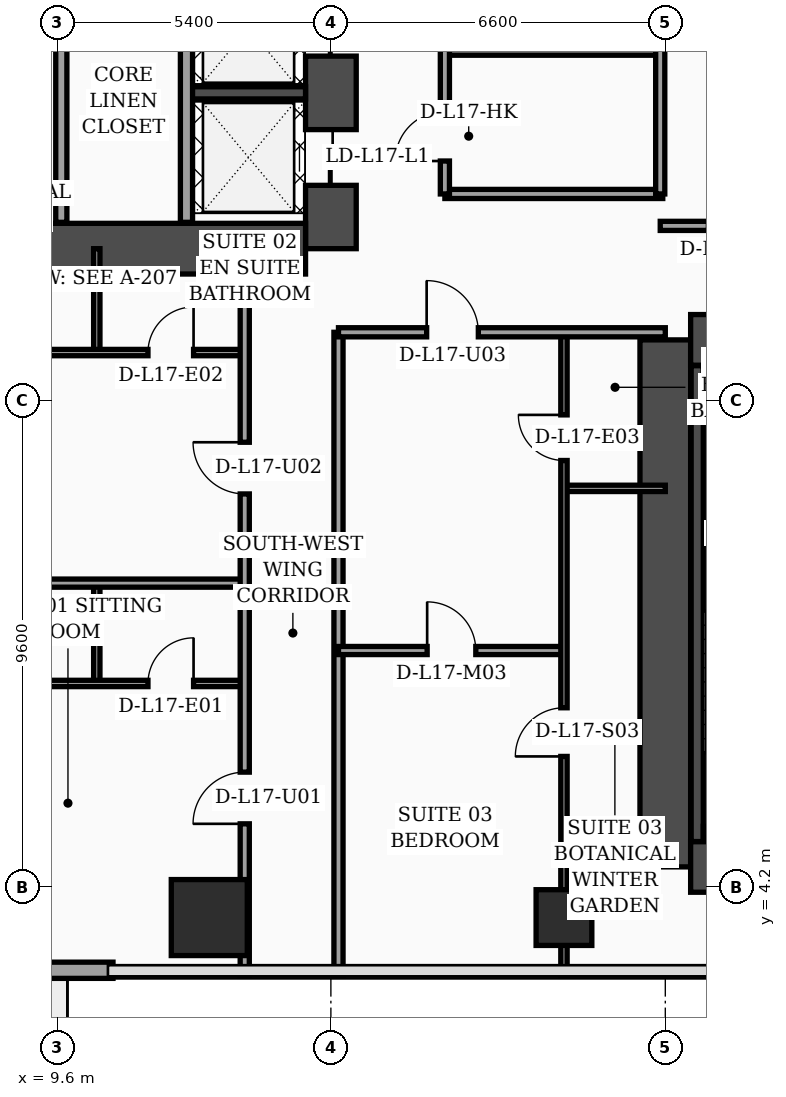
"""IFC4 building model, lengths in metres.
Left out: names, types, materials, properties, quantities, classifications, styles, units other than length and angle.
Written with IfcOpenShell. Run it as: python <this file> out.ifc"""

import sys

from ifc_helpers import new_model, si_unit, direction, frame, frame_2d, origin, origin_2d, place, context, subcontext, project, spatial, rectangle, hollow_rectangle, extrude, element, fill, save


model = new_model("IFC4")
c1 = context("Model", 3, precision=1e-05, world=origin(), true_north=direction((0.0, 1.0)))
c2 = subcontext(c1, "Body", "Model", "MODEL_VIEW")
j1 = project(units=[si_unit("LENGTHUNIT", "METRE"), si_unit("PLANEANGLEUNIT", "RADIAN")], contexts=[c1])
p1 = place(None, origin())
s1 = spatial("IfcSite", under=j1, at=p1, CompositionType="ELEMENT")
p2 = place(p1, origin())
s2 = spatial("IfcBuilding", under=s1, at=p2, CompositionType="ELEMENT")
p3 = place(p2, frame((0.0, 0.0, 73.6)))
s3 = spatial("IfcBuildingStorey", under=s2, at=p3, CompositionType="ELEMENT", Elevation=73.6)
p4 = place(p3, frame((15.0, 16.8, 0.0), z_axis=(0.0, 0.0, 1.0), x_axis=(0.0, 1.0, 0.0)))
e1 = element("IfcWall", 1, at=p4, inside=s3, PredefinedType="SHEAR", context=c2, shape_type="SweptSolid", body=[
    extrude(rectangle(XDim=21.6, YDim=1.0, at=frame_2d((10.8, 0.0))), origin(), (0.0, 0.0, 1.0), 3.56),
])
p5 = place(p4, frame((8.65, 0.0, 0.0)))
e2 = element("IfcOpeningElement", 2, at=p5, cuts=e1, PredefinedType="OPENING", context=c2, shape_type="SweptSolid", body=[
    extrude(rectangle(XDim=1.1, YDim=2.2, at=frame_2d((0.55, 1.1))), frame((0.0, 0.51, 0.0), z_axis=(0.0, -1.0, 0.0), x_axis=(1.0, 0.0, 0.0)), (0.0, 0.0, 1.0), 1.02),
])
p6 = place(p4, frame((1.25, 0.0, 0.0)))
e3 = element("IfcOpeningElement", 3, at=p6, cuts=e1, PredefinedType="OPENING", context=c2, shape_type="SweptSolid", body=[
    extrude(rectangle(XDim=1.1, YDim=2.2, at=frame_2d((0.55, 1.1))), frame((0.0, 0.51, 0.0), z_axis=(0.0, -1.0, 0.0), x_axis=(1.0, 0.0, 0.0)), (0.0, 0.0, 1.0), 1.02),
])
p7 = place(p4, frame((3.8, 0.0, 0.0)))
e4 = element("IfcOpeningElement", 4, at=p7, cuts=e1, PredefinedType="OPENING", context=c2, shape_type="SweptSolid", body=[
    extrude(rectangle(XDim=1.1, YDim=2.2, at=frame_2d((0.55, 1.1))), frame((0.0, 0.51, 0.0), z_axis=(0.0, -1.0, 0.0), x_axis=(1.0, 0.0, 0.0)), (0.0, 0.0, 1.0), 1.02),
])
p8 = place(p4, frame((6.35, 0.0, 0.0)))
e5 = element("IfcOpeningElement", 5, at=p8, cuts=e1, PredefinedType="OPENING", context=c2, shape_type="SweptSolid", body=[
    extrude(rectangle(XDim=1.1, YDim=2.2, at=frame_2d((0.55, 1.1))), frame((0.0, 0.51, 0.0), z_axis=(0.0, -1.0, 0.0), x_axis=(1.0, 0.0, 0.0)), (0.0, 0.0, 1.0), 1.02),
])
p9 = place(p3, frame((4.7, 16.8, 0.0), z_axis=(0.0, 0.0, 1.0), x_axis=(1.0, 0.0, 0.0)))
e6 = element("IfcWall", 6, at=p9, inside=s3, PredefinedType="SHEAR", context=c2, shape_type="SweptSolid", body=[
    extrude(rectangle(XDim=9.8, YDim=1.0, at=frame_2d((4.9, 0.0))), origin(), (0.0, 0.0, 1.0), 3.56),
])
p10 = place(p3, frame((21.6, 4.6, 0.0), z_axis=(0.0, 0.0, 1.0), x_axis=(0.0, 1.0, 0.0)))
e7 = element("IfcWall", 7, at=p10, inside=s3, PredefinedType="SHEAR", context=c2, shape_type="SweptSolid", body=[
    extrude(rectangle(XDim=10.4, YDim=1.0, at=frame_2d((5.2, 0.0))), origin(), (0.0, 0.0, 1.0), 3.56),
])
p11 = place(p3, frame((22.1, 15.0, 0.0), z_axis=(0.0, 0.0, 1.0), x_axis=(1.0, 0.0, 0.0)))
e8 = element("IfcWall", 8, at=p11, inside=s3, PredefinedType="SHEAR", context=c2, shape_type="SweptSolid", body=[
    extrude(rectangle(XDim=9.8, YDim=1.0, at=frame_2d((4.9, 0.0))), origin(), (0.0, 0.0, 1.0), 3.56),
])
p12 = place(p11, frame((4.8, 0.0, 0.0)))
e9 = element("IfcOpeningElement", 9, at=p12, cuts=e8, PredefinedType="OPENING", context=c2, shape_type="SweptSolid", body=[
    extrude(rectangle(XDim=1.1, YDim=2.2, at=frame_2d((0.55, 1.1))), frame((0.0, 0.51, 0.0), z_axis=(0.0, -1.0, 0.0), x_axis=(1.0, 0.0, 0.0)), (0.0, 0.0, 1.0), 1.02),
])
p13 = place(p3, frame((22.1, 4.6, 0.0), z_axis=(0.0, 0.0, 1.0), x_axis=(1.0, 0.0, 0.0)))
e10 = element("IfcWall", 10, at=p13, inside=s3, PredefinedType="SHEAR", context=c2, shape_type="SweptSolid", body=[
    extrude(rectangle(XDim=9.8, YDim=1.0, at=frame_2d((4.9, 0.0))), origin(), (0.0, 0.0, 1.0), 3.56),
])
p14 = place(p3, frame((22.23, 5.1, 0.0), z_axis=(0.0, 0.0, 1.0), x_axis=(0.0, 1.0, 0.0)))
e11 = element("IfcWall", 11, at=p14, inside=s3, PredefinedType="SOLIDWALL", context=c2, shape_type="SweptSolid", body=[
    extrude(rectangle(XDim=9.39, YDim=0.24, at=frame_2d((4.695, 0.0))), origin(), (0.0, 0.0, 1.0), 3.56),
])
for number, where, z_axis, x_axis in (
    (12, (22.35, 5.28, 0.0), (0.0, 0.0, 1.0), (1.0, 0.0, 0.0)),
    (13, (22.35, 14.37, 0.0), (0.0, 0.0, 1.0), (1.0, 0.0, 0.0)),
):
    element("IfcWall", number, at=place(p3, frame(where, z_axis=z_axis, x_axis=x_axis)), inside=s3, PredefinedType="SOLIDWALL", context=c2, shape_type="SweptSolid", body=[
        extrude(rectangle(XDim=3.1, YDim=0.24, at=frame_2d((1.55, 0.0))), origin(), (0.0, 0.0, 1.0), 3.56),
    ])
p15 = place(p3, frame((12.18, 19.875, 0.0), z_axis=(0.0, 0.0, 1.0), x_axis=(1.0, 0.0, 0.0)))
e14 = element("IfcWall", 14, at=p15, inside=s3, PredefinedType="SOLIDWALL", context=c2, shape_type="SweptSolid", body=[
    extrude(rectangle(XDim=2.32, YDim=0.24, at=frame_2d((1.16, 0.0))), origin(), (0.0, 0.0, 1.0), 3.56),
])
p16 = place(p3, frame((12.6, 3.6, 0.0), z_axis=(0.0, 0.0, 1.0), x_axis=(1.0, 0.0, 0.0)))
e15 = element("IfcColumn", 15, at=p16, inside=s3, PredefinedType="COLUMN", context=c2, shape_type="SweptSolid", body=[
    extrude(rectangle(XDim=1.5, YDim=1.5, at=origin_2d()), origin(), (0.0, 0.0, 1.0), 3.56),
])
p17 = place(p3, frame((19.6, 3.6, 0.0), z_axis=(0.0, 0.0, 1.0), x_axis=(1.0, 0.0, 0.0)))
e16 = element("IfcColumn", 16, at=p17, inside=s3, PredefinedType="COLUMN", context=c2, shape_type="SweptSolid", body=[
    extrude(hollow_rectangle(XDim=1.1, YDim=1.1, WallThickness=0.045, at=origin_2d()), origin(), (0.0, 0.0, 1.0), 3.56),
])
p18 = place(p3, frame((3.1, 2.56, 0.0), z_axis=(0.0, 0.0, 1.0), x_axis=(1.0, 0.0, 0.0)))
e17 = element("IfcWall", 17, at=p18, inside=s3, PredefinedType="SOLIDWALL", context=c2, shape_type="SweptSolid", body=[
    extrude(rectangle(XDim=7.6, YDim=0.32, at=frame_2d((3.8, 0.0))), origin(), (0.0, 0.0, 1.0), 3.56),
])
p19 = place(p18, frame((0.45, 0.0, 0.75)))
e18 = element("IfcOpeningElement", 18, at=p19, cuts=e17, PredefinedType="OPENING", context=c2, shape_type="SweptSolid", body=[
    extrude(rectangle(XDim=1.0, YDim=1.6, at=frame_2d((0.5, 0.8))), frame((0.0, 0.17, 0.0), z_axis=(0.0, -1.0, 0.0), x_axis=(1.0, 0.0, 0.0)), (0.0, 0.0, 1.0), 0.34),
])
p20 = place(p18, frame((3.8, 0.0, 0.0)))
e19 = element("IfcOpeningElement", 19, at=p20, cuts=e17, PredefinedType="OPENING", context=c2, shape_type="SweptSolid", body=[
    extrude(rectangle(XDim=1.4, YDim=2.25, at=frame_2d((0.7, 1.125))), frame((0.0, 0.17, 0.0), z_axis=(0.0, -1.0, 0.0), x_axis=(1.0, 0.0, 0.0)), (0.0, 0.0, 1.0), 0.34),
])
p21 = place(p3, frame((9.68, 17.32, 0.0), z_axis=(0.0, 0.0, 1.0), x_axis=(0.0, 1.0, 0.0)))
e20 = element("IfcWall", 20, at=p21, inside=s3, PredefinedType="SOLIDWALL", context=c2, shape_type="SweptSolid", body=[
    extrude(rectangle(XDim=7.68, YDim=0.22, at=frame_2d((3.84, 0.0))), origin(), (0.0, 0.0, 1.0), 3.56),
])
p22 = place(p3, frame((12.15, 17.32, 0.0), z_axis=(0.0, 0.0, 1.0), x_axis=(0.0, 1.0, 0.0)))
e21 = element("IfcWall", 21, at=p22, inside=s3, PredefinedType="SOLIDWALL", context=c2, shape_type="SweptSolid", body=[
    extrude(rectangle(XDim=7.65, YDim=0.24, at=frame_2d((3.825, 0.0))), origin(), (0.0, 0.0, 1.0), 3.56),
])
p23 = place(p3, frame((10.38, 8.22, 0.0), z_axis=(0.0, 0.0, 1.0), x_axis=(0.0, 1.0, 0.0)))
e22 = element("IfcWall", 22, at=p23, inside=s3, PredefinedType="PARTITIONING", context=c2, shape_type="SweptSolid", body=[
    extrude(rectangle(XDim=1.98, YDim=0.125, at=frame_2d((0.99, 0.0))), origin(), (0.0, 0.0, 1.0), 3.14),
])
p24 = place(p3, frame((3.2, 8.22, 0.0), z_axis=(0.0, 0.0, 1.0), x_axis=(1.0, 0.0, 0.0)))
e23 = element("IfcWall", 23, at=p24, inside=s3, PredefinedType="PARTITIONING", context=c2, shape_type="SweptSolid", body=[
    extrude(rectangle(XDim=10.1, YDim=0.125, at=frame_2d((5.05, 0.0))), origin(), (0.0, 0.0, 1.0), 2.84),
])
p25 = place(p24, frame((3.29, 0.0, 0.0)))
e24 = element("IfcOpeningElement", 24, at=p25, cuts=e23, PredefinedType="OPENING", context=c2, shape_type="SweptSolid", body=[
    extrude(rectangle(XDim=0.96, YDim=2.2, at=frame_2d((0.48, 1.1))), frame((0.0, 0.073, 0.0), z_axis=(0.0, -1.0, 0.0), x_axis=(1.0, 0.0, 0.0)), (0.0, 0.0, 1.0), 0.145),
])
p26 = place(p24, frame((8.19, 0.0, 0.0)))
e25 = element("IfcOpeningElement", 25, at=p26, cuts=e23, PredefinedType="OPENING", context=c2, shape_type="SweptSolid", body=[
    extrude(rectangle(XDim=0.9, YDim=2.15, at=frame_2d((0.45, 1.075))), frame((0.0, 0.073, 0.0), z_axis=(0.0, -1.0, 0.0), x_axis=(1.0, 0.0, 0.0)), (0.0, 0.0, 1.0), 0.145),
])
p27 = place(p3, frame((10.38, 14.75, 0.0), z_axis=(0.0, 0.0, 1.0), x_axis=(0.0, 1.0, 0.0)))
e26 = element("IfcWall", 26, at=p27, inside=s3, PredefinedType="PARTITIONING", context=c2, shape_type="SweptSolid", body=[
    extrude(rectangle(XDim=2.05, YDim=0.125, at=frame_2d((1.025, 0.0))), origin(), (0.0, 0.0, 1.0), 3.56),
])
p28 = place(p3, frame((0.08, 14.75, 0.0), z_axis=(0.0, 0.0, 1.0), x_axis=(1.0, 0.0, 0.0)))
e27 = element("IfcWall", 27, at=p28, inside=s3, PredefinedType="PARTITIONING", context=c2, shape_type="SweptSolid", body=[
    extrude(rectangle(XDim=13.22, YDim=0.125, at=frame_2d((6.61, 0.0))), origin(), (0.0, 0.0, 1.0), 2.84),
])
p29 = place(p28, frame((4.67, 0.0, 0.0)))
e28 = element("IfcOpeningElement", 28, at=p29, cuts=e27, PredefinedType="OPENING", context=c2, shape_type="SweptSolid", body=[
    extrude(rectangle(XDim=0.96, YDim=2.2, at=frame_2d((0.48, 1.1))), frame((0.0, 0.073, 0.0), z_axis=(0.0, -1.0, 0.0), x_axis=(1.0, 0.0, 0.0)), (0.0, 0.0, 1.0), 0.145),
])
p30 = place(p28, frame((11.31, 0.0, 0.0)))
e29 = element("IfcOpeningElement", 29, at=p30, cuts=e27, PredefinedType="OPENING", context=c2, shape_type="SweptSolid", body=[
    extrude(rectangle(XDim=0.9, YDim=2.15, at=frame_2d((0.45, 1.075))), frame((0.0, 0.073, 0.0), z_axis=(0.0, -1.0, 0.0), x_axis=(1.0, 0.0, 0.0)), (0.0, 0.0, 1.0), 0.145),
])
p31 = place(p3, frame((0.08, 10.2, 0.0), z_axis=(0.0, 0.0, 1.0), x_axis=(1.0, 0.0, 0.0)))
e30 = element("IfcWall", 30, at=p31, inside=s3, PredefinedType="PARTITIONING", context=c2, shape_type="SweptSolid", body=[
    extrude(rectangle(XDim=13.22, YDim=0.16, at=frame_2d((6.61, 0.0))), origin(), (0.0, 0.0, 1.0), 2.84),
])
p32 = place(p3, frame((13.3, 2.44, 0.0), z_axis=(0.0, 0.0, 1.0), x_axis=(0.0, 1.0, 0.0)))
e31 = element("IfcWall", 31, at=p32, inside=s3, PredefinedType="PARTITIONING", context=c2, shape_type="SweptSolid", body=[
    extrude(rectangle(XDim=14.36, YDim=0.18, at=frame_2d((7.18, 0.0))), origin(), (0.0, 0.0, 1.0), 3.04),
])
p33 = place(p32, frame((3.01, 0.0, 0.0)))
e32 = element("IfcOpeningElement", 32, at=p33, cuts=e31, PredefinedType="OPENING", context=c2, shape_type="SweptSolid", body=[
    extrude(rectangle(XDim=1.02, YDim=2.2, at=frame_2d((0.51, 1.1))), frame((0.0, 0.1, 0.0), z_axis=(0.0, -1.0, 0.0), x_axis=(1.0, 0.0, 0.0)), (0.0, 0.0, 1.0), 0.2),
])
p34 = place(p32, frame((9.52, 0.0, 0.0)))
e33 = element("IfcOpeningElement", 33, at=p34, cuts=e31, PredefinedType="OPENING", context=c2, shape_type="SweptSolid", body=[
    extrude(rectangle(XDim=1.02, YDim=2.2, at=frame_2d((0.51, 1.1))), frame((0.0, 0.1, 0.0), z_axis=(0.0, -1.0, 0.0), x_axis=(1.0, 0.0, 0.0)), (0.0, 0.0, 1.0), 0.2),
])
p35 = place(p3, frame((15.15, 2.44, 0.0), z_axis=(0.0, 0.0, 1.0), x_axis=(0.0, 1.0, 0.0)))
e34 = element("IfcWall", 34, at=p35, inside=s3, PredefinedType="PARTITIONING", context=c2, shape_type="SweptSolid", body=[
    extrude(rectangle(XDim=12.71, YDim=0.18, at=frame_2d((6.355, 0.0))), origin(), (0.0, 0.0, 1.0), 3.04),
])
p36 = place(p3, frame((19.6, 12.07, 0.0), z_axis=(0.0, 0.0, 1.0), x_axis=(1.0, 0.0, 0.0)))
e35 = element("IfcWall", 35, at=p36, inside=s3, PredefinedType="PARTITIONING", context=c2, shape_type="SweptSolid", body=[
    extrude(rectangle(XDim=2.0, YDim=0.125, at=frame_2d((1.0, 0.0))), origin(), (0.0, 0.0, 1.0), 3.56),
])
p37 = place(p3, frame((15.15, 8.87, 0.0), z_axis=(0.0, 0.0, 1.0), x_axis=(1.0, 0.0, 0.0)))
e36 = element("IfcWall", 36, at=p37, inside=s3, PredefinedType="PARTITIONING", context=c2, shape_type="SweptSolid", body=[
    extrude(rectangle(XDim=4.45, YDim=0.16, at=frame_2d((2.225, 0.0))), origin(), (0.0, 0.0, 1.0), 3.56),
])
p38 = place(p37, frame((1.75, 0.0, 0.0)))
e37 = element("IfcOpeningElement", 37, at=p38, cuts=e36, PredefinedType="OPENING", context=c2, shape_type="SweptSolid", body=[
    extrude(rectangle(XDim=0.96, YDim=2.2, at=frame_2d((0.48, 1.1))), frame((0.0, 0.09, 0.0), z_axis=(0.0, -1.0, 0.0), x_axis=(1.0, 0.0, 0.0)), (0.0, 0.0, 1.0), 0.18),
])
p39 = place(p3, frame((19.6, 2.44, 0.0), z_axis=(0.0, 0.0, 1.0), x_axis=(0.0, 1.0, 0.0)))
e38 = element("IfcWall", 38, at=p39, inside=s3, PredefinedType="PARTITIONING", context=c2, shape_type="SweptSolid", body=[
    extrude(rectangle(XDim=12.71, YDim=0.125, at=frame_2d((6.355, 0.0))), origin(), (0.0, 0.0, 1.0), 2.34),
])
p40 = place(p39, frame((4.34, 0.0, 0.0)))
e39 = element("IfcOpeningElement", 39, at=p40, cuts=e38, PredefinedType="OPENING", context=c2, shape_type="SweptSolid", body=[
    extrude(rectangle(XDim=0.96, YDim=2.2, at=frame_2d((0.48, 1.1))), frame((0.0, 0.073, 0.0), z_axis=(0.0, -1.0, 0.0), x_axis=(1.0, 0.0, 0.0)), (0.0, 0.0, 1.0), 0.145),
])
p41 = place(p39, frame((10.18, 0.0, 0.0)))
e40 = element("IfcOpeningElement", 40, at=p41, cuts=e38, PredefinedType="OPENING", context=c2, shape_type="SweptSolid", body=[
    extrude(rectangle(XDim=0.9, YDim=2.15, at=frame_2d((0.45, 1.075))), frame((0.0, 0.073, 0.0), z_axis=(0.0, -1.0, 0.0), x_axis=(1.0, 0.0, 0.0)), (0.0, 0.0, 1.0), 0.145),
])
p42 = place(p3, frame((15.15, 15.15, 0.0), z_axis=(0.0, 0.0, 1.0), x_axis=(1.0, 0.0, 0.0)))
e41 = element("IfcWall", 41, at=p42, inside=s3, PredefinedType="PARTITIONING", context=c2, shape_type="SweptSolid", body=[
    extrude(rectangle(XDim=6.45, YDim=0.18, at=frame_2d((3.225, 0.0))), origin(), (0.0, 0.0, 1.0), 2.34),
])
p43 = place(p42, frame((1.74, 0.0, 0.0)))
e42 = element("IfcOpeningElement", 42, at=p43, cuts=e41, PredefinedType="OPENING", context=c2, shape_type="SweptSolid", body=[
    extrude(rectangle(XDim=1.02, YDim=2.2, at=frame_2d((0.51, 1.1))), frame((0.0, 0.1, 0.0), z_axis=(0.0, -1.0, 0.0), x_axis=(1.0, 0.0, 0.0)), (0.0, 0.0, 1.0), 0.2),
])
p44 = place(p3, frame((17.25, 17.88, 0.0), z_axis=(0.0, 0.0, 1.0), x_axis=(1.0, 0.0, 0.0)))
e43 = element("IfcWall", 43, at=p44, inside=s3, PredefinedType="PARTITIONING", context=c2, shape_type="SweptSolid", body=[
    extrude(rectangle(XDim=4.3, YDim=0.18, at=frame_2d((2.15, 0.0))), origin(), (0.0, 0.0, 1.0), 3.56),
])
p45 = place(p3, frame((17.25, 20.68, 0.0), z_axis=(0.0, 0.0, 1.0), x_axis=(1.0, 0.0, 0.0)))
e44 = element("IfcWall", 44, at=p45, inside=s3, PredefinedType="PARTITIONING", context=c2, shape_type="SweptSolid", body=[
    extrude(rectangle(XDim=4.3, YDim=0.125, at=frame_2d((2.15, 0.0))), origin(), (0.0, 0.0, 1.0), 3.56),
])
p46 = place(p3, frame((21.5, 17.88, 0.0), z_axis=(0.0, 0.0, 1.0), x_axis=(0.0, 1.0, 0.0)))
e45 = element("IfcWall", 45, at=p46, inside=s3, PredefinedType="PARTITIONING", context=c2, shape_type="SweptSolid", body=[
    extrude(rectangle(XDim=6.44, YDim=0.18, at=frame_2d((3.22, 0.0))), origin(), (0.0, 0.0, 1.0), 3.56),
])
p47 = place(p3, frame((17.25, 17.88, 0.0), z_axis=(0.0, 0.0, 1.0), x_axis=(0.0, 1.0, 0.0)))
e46 = element("IfcWall", 46, at=p47, inside=s3, PredefinedType="PARTITIONING", context=c2, shape_type="SweptSolid", body=[
    extrude(rectangle(XDim=6.44, YDim=0.18, at=frame_2d((3.22, 0.0))), origin(), (0.0, 0.0, 1.0), 3.56),
])
p48 = place(p47, frame((0.65, 0.0, 0.0)))
e47 = element("IfcOpeningElement", 47, at=p48, cuts=e46, PredefinedType="OPENING", context=c2, shape_type="SweptSolid", body=[
    extrude(rectangle(XDim=0.98, YDim=2.15, at=frame_2d((0.49, 1.075))), frame((0.0, 0.1, 0.0), z_axis=(0.0, -1.0, 0.0), x_axis=(1.0, 0.0, 0.0)), (0.0, 0.0, 1.0), 0.2),
])
p49 = place(p47, frame((3.27, 0.0, 0.0)))
e48 = element("IfcOpeningElement", 48, at=p49, cuts=e46, PredefinedType="OPENING", context=c2, shape_type="SweptSolid", body=[
    extrude(rectangle(XDim=0.96, YDim=2.2, at=frame_2d((0.48, 1.1))), frame((0.0, 0.1, 0.0), z_axis=(0.0, -1.0, 0.0), x_axis=(1.0, 0.0, 0.0)), (0.0, 0.0, 1.0), 0.2),
])
p50 = place(p3, frame((21.5, 17.25, 0.0), z_axis=(0.0, 0.0, 1.0), x_axis=(1.0, 0.0, 0.0)))
e49 = element("IfcWall", 49, at=p50, inside=s3, PredefinedType="PARTITIONING", context=c2, shape_type="SweptSolid", body=[
    extrude(rectangle(XDim=19.65, YDim=0.18, at=frame_2d((9.825, 0.0))), origin(), (0.0, 0.0, 1.0), 2.84),
])
p51 = place(p50, frame((0.95, 0.0, 0.0)))
e50 = element("IfcOpeningElement", 50, at=p51, cuts=e49, PredefinedType="OPENING", context=c2, shape_type="SweptSolid", body=[
    extrude(rectangle(XDim=1.02, YDim=2.2, at=frame_2d((0.51, 1.1))), frame((0.0, 0.1, 0.0), z_axis=(0.0, -1.0, 0.0), x_axis=(1.0, 0.0, 0.0)), (0.0, 0.0, 1.0), 0.2),
])
p52 = place(p50, frame((7.47, 0.0, 0.0)))
e51 = element("IfcOpeningElement", 51, at=p52, cuts=e49, PredefinedType="OPENING", context=c2, shape_type="SweptSolid", body=[
    extrude(rectangle(XDim=1.02, YDim=2.2, at=frame_2d((0.51, 1.1))), frame((0.0, 0.1, 0.0), z_axis=(0.0, -1.0, 0.0), x_axis=(1.0, 0.0, 0.0)), (0.0, 0.0, 1.0), 0.2),
])
p53 = place(p50, frame((13.98, 0.0, 0.0)))
e52 = element("IfcOpeningElement", 52, at=p53, cuts=e49, PredefinedType="OPENING", context=c2, shape_type="SweptSolid", body=[
    extrude(rectangle(XDim=1.02, YDim=2.2, at=frame_2d((0.51, 1.1))), frame((0.0, 0.1, 0.0), z_axis=(0.0, -1.0, 0.0), x_axis=(1.0, 0.0, 0.0)), (0.0, 0.0, 1.0), 0.2),
])
p54 = place(p26, origin())
e53 = element("IfcDoor", 53, at=p54, inside=s3, OperationType="SINGLE_SWING_RIGHT", PredefinedType="DOOR", context=c2, shape_type="SweptSolid", body=[
    extrude(rectangle(XDim=0.9, YDim=2.15, at=frame_2d((0.45, 1.075))), frame((0.0, 0.025, 0.0), z_axis=(0.0, -1.0, 0.0), x_axis=(1.0, 0.0, 0.0)), (0.0, 0.0, 1.0), 0.05),
])
fill(e25, e53)
p55 = place(p30, origin())
e54 = element("IfcDoor", 54, at=p55, inside=s3, OperationType="SINGLE_SWING_RIGHT", PredefinedType="DOOR", context=c2, shape_type="SweptSolid", body=[
    extrude(rectangle(XDim=0.9, YDim=2.15, at=frame_2d((0.45, 1.075))), frame((0.0, 0.025, 0.0), z_axis=(0.0, -1.0, 0.0), x_axis=(1.0, 0.0, 0.0)), (0.0, 0.0, 1.0), 0.05),
])
fill(e29, e54)
p56 = place(p33, origin())
e55 = element("IfcDoor", 55, at=p56, inside=s3, OperationType="SINGLE_SWING_LEFT", PredefinedType="DOOR", context=c2, shape_type="SweptSolid", body=[
    extrude(rectangle(XDim=1.02, YDim=2.2, at=frame_2d((0.51, 1.1))), frame((0.0, 0.025, 0.0), z_axis=(0.0, -1.0, 0.0), x_axis=(1.0, 0.0, 0.0)), (0.0, 0.0, 1.0), 0.05),
])
fill(e32, e55)
p57 = place(p34, origin())
e56 = element("IfcDoor", 56, at=p57, inside=s3, OperationType="SINGLE_SWING_RIGHT", PredefinedType="DOOR", context=c2, shape_type="SweptSolid", body=[
    extrude(rectangle(XDim=1.02, YDim=2.2, at=frame_2d((0.51, 1.1))), frame((0.0, 0.025, 0.0), z_axis=(0.0, -1.0, 0.0), x_axis=(1.0, 0.0, 0.0)), (0.0, 0.0, 1.0), 0.05),
])
fill(e33, e56)
p58 = place(p38, origin())
e57 = element("IfcDoor", 57, at=p58, inside=s3, OperationType="SINGLE_SWING_LEFT", PredefinedType="DOOR", context=c2, shape_type="SweptSolid", body=[
    extrude(rectangle(XDim=0.96, YDim=2.2, at=frame_2d((0.48, 1.1))), frame((0.0, 0.025, 0.0), z_axis=(0.0, -1.0, 0.0), x_axis=(1.0, 0.0, 0.0)), (0.0, 0.0, 1.0), 0.05),
])
fill(e37, e57)
p59 = place(p40, origin())
e58 = element("IfcDoor", 58, at=p59, inside=s3, OperationType="SINGLE_SWING_LEFT", PredefinedType="DOOR", context=c2, shape_type="SweptSolid", body=[
    extrude(rectangle(XDim=0.96, YDim=2.2, at=frame_2d((0.48, 1.1))), frame((0.0, 0.025, 0.0), z_axis=(0.0, -1.0, 0.0), x_axis=(1.0, 0.0, 0.0)), (0.0, 0.0, 1.0), 0.05),
])
fill(e39, e58)
p60 = place(p41, origin())
e59 = element("IfcDoor", 59, at=p60, inside=s3, OperationType="SINGLE_SWING_RIGHT", PredefinedType="DOOR", context=c2, shape_type="SweptSolid", body=[
    extrude(rectangle(XDim=0.9, YDim=2.15, at=frame_2d((0.45, 1.075))), frame((0.0, 0.025, 0.0), z_axis=(0.0, -1.0, 0.0), x_axis=(1.0, 0.0, 0.0)), (0.0, 0.0, 1.0), 0.05),
])
fill(e40, e59)
p61 = place(p43, origin())
e60 = element("IfcDoor", 60, at=p61, inside=s3, OperationType="SINGLE_SWING_LEFT", PredefinedType="DOOR", context=c2, shape_type="SweptSolid", body=[
    extrude(rectangle(XDim=1.02, YDim=2.2, at=frame_2d((0.51, 1.1))), frame((0.0, 0.025, 0.0), z_axis=(0.0, -1.0, 0.0), x_axis=(1.0, 0.0, 0.0)), (0.0, 0.0, 1.0), 0.05),
])
fill(e42, e60)
p62 = place(p48, origin())
e61 = element("IfcDoor", 61, at=p62, inside=s3, OperationType="SINGLE_SWING_LEFT", PredefinedType="DOOR", context=c2, shape_type="SweptSolid", body=[
    extrude(rectangle(XDim=0.98, YDim=2.15, at=frame_2d((0.49, 1.075))), frame((0.0, 0.025, 0.0), z_axis=(0.0, -1.0, 0.0), x_axis=(1.0, 0.0, 0.0)), (0.0, 0.0, 1.0), 0.05),
])
fill(e47, e61)
p63 = place(p6, origin())
e62 = element("IfcDoor", 62, at=p63, inside=s3, OperationType="DOUBLE_DOOR_SLIDING", PredefinedType="DOOR", context=c2, shape_type="SweptSolid", body=[
    extrude(rectangle(XDim=1.1, YDim=2.2, at=frame_2d((0.55, 1.1))), frame((0.0, 0.025, 0.0), z_axis=(0.0, -1.0, 0.0), x_axis=(1.0, 0.0, 0.0)), (0.0, 0.0, 1.0), 0.05),
])
fill(e3, e62)
p64 = place(p7, origin())
e63 = element("IfcDoor", 63, at=p64, inside=s3, OperationType="DOUBLE_DOOR_SLIDING", PredefinedType="DOOR", context=c2, shape_type="SweptSolid", body=[
    extrude(rectangle(XDim=1.1, YDim=2.2, at=frame_2d((0.55, 1.1))), frame((0.0, 0.025, 0.0), z_axis=(0.0, -1.0, 0.0), x_axis=(1.0, 0.0, 0.0)), (0.0, 0.0, 1.0), 0.05),
])
fill(e4, e63)
save(model, sys.argv[1])
